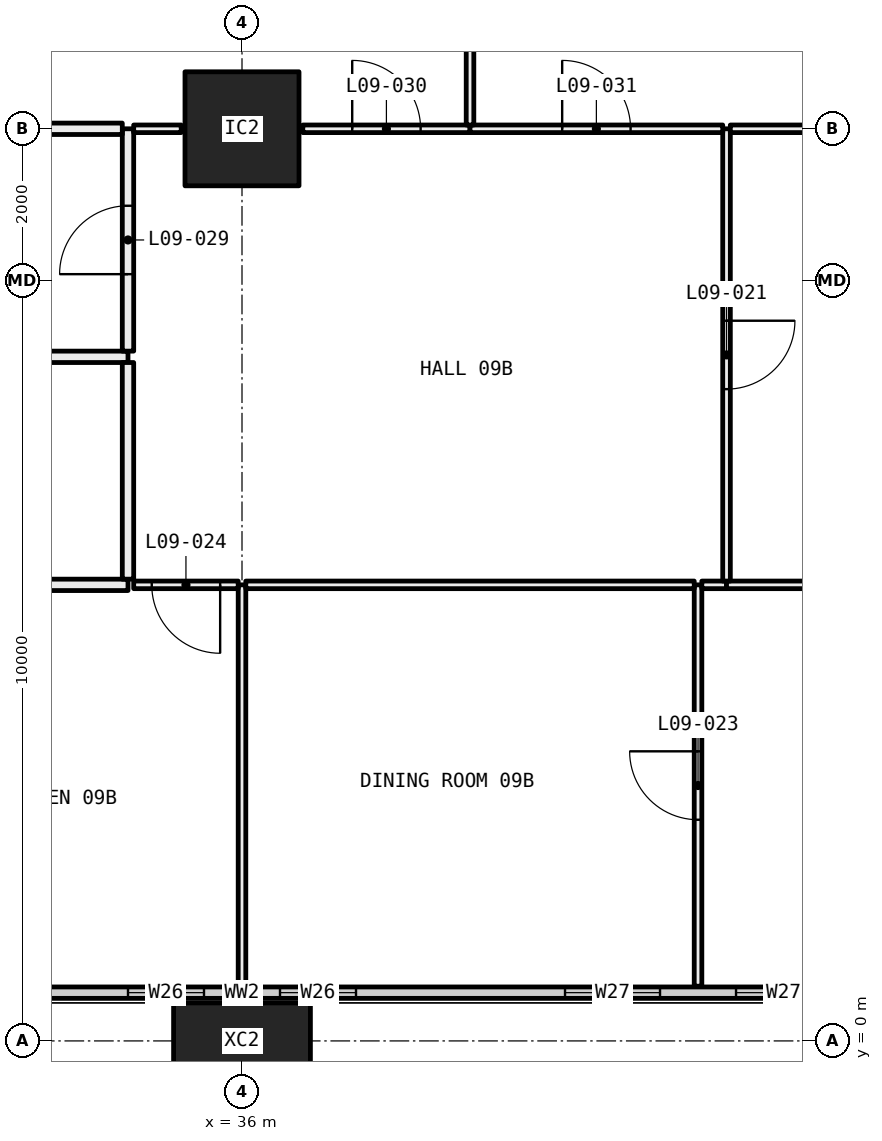
"""IFC4 building model, lengths in metres.
Left out: names, types, materials, properties, quantities, classifications, styles, units other than length and angle.
Written with IfcOpenShell. Run it as: python <this file> out.ifc"""

import sys

from ifc_helpers import new_model, si_unit, direction, frame, frame_2d, origin, origin_2d, place, context, subcontext, project, spatial, rectangle, hollow_rectangle, extrude, element, fill, save


model = new_model("IFC4")
c1 = context("Model", 3, precision=1e-05, world=origin(), true_north=direction((0.0, 1.0)))
c2 = subcontext(c1, "Body", "Model", "MODEL_VIEW")
j1 = project(units=[si_unit("LENGTHUNIT", "METRE"), si_unit("PLANEANGLEUNIT", "RADIAN")], contexts=[c1])
p1 = place(None, origin())
s1 = spatial("IfcSite", under=j1, at=p1, CompositionType="ELEMENT")
p2 = place(p1, origin())
s2 = spatial("IfcBuilding", under=s1, at=p2, CompositionType="ELEMENT")
p3 = place(p2, frame((0.0, 0.0, 43.8)))
s3 = spatial("IfcBuildingStorey", under=s2, at=p3, CompositionType="ELEMENT", Elevation=43.8)
p4 = place(p3, frame((36.0, 0.0, -0.4), z_axis=(0.0, 0.0, 1.0), x_axis=(1.0, 0.0, 0.0)))
e1 = element("IfcColumn", 1, at=p4, inside=s3, PredefinedType="COLUMN", context=c2, shape_type="SweptSolid", body=[
    extrude(hollow_rectangle(XDim=1.8, YDim=1.0, WallThickness=0.07, at=origin_2d()), origin(), (0.0, 0.0, 1.0), 3.45),
])
p5 = place(p3, frame((36.0, 12.0, 0.0), z_axis=(0.0, 0.0, 1.0), x_axis=(1.0, 0.0, 0.0)))
e2 = element("IfcColumn", 2, at=p5, inside=s3, PredefinedType="COLUMN", context=c2, shape_type="SweptSolid", body=[
    extrude(hollow_rectangle(XDim=1.5, YDim=1.5, WallThickness=0.065, at=origin_2d()), origin(), (0.0, 0.0, 1.0), 3.05),
])
p6 = place(p3, frame((6.56, 0.635, 0.0), z_axis=(0.0, 0.0, 1.0), x_axis=(1.0, 0.0, 0.0)))
e3 = element("IfcWall", 3, at=p6, inside=s3, PredefinedType="ELEMENTEDWALL", context=c2, shape_type="SweptSolid", body=[
    extrude(rectangle(XDim=58.88, YDim=0.15, at=frame_2d((29.44, 0.0))), origin(), (0.0, 0.0, 1.0), 3.05),
])
p7 = place(p6, frame((0.44, 0.0, 0.45)))
e4 = element("IfcOpeningElement", 4, at=p7, cuts=e3, PredefinedType="OPENING", context=c2, shape_type="SweptSolid", body=[
    extrude(rectangle(XDim=4.5, YDim=2.55, at=frame_2d((2.25, 1.275))), frame((0.0, 0.085, 0.0), z_axis=(0.0, -1.0, 0.0), x_axis=(1.0, 0.0, 0.0)), (0.0, 0.0, 1.0), 0.17),
])
p8 = place(p6, frame((5.94, 0.0, 0.45)))
e5 = element("IfcOpeningElement", 5, at=p8, cuts=e3, PredefinedType="OPENING", context=c2, shape_type="SweptSolid", body=[
    extrude(rectangle(XDim=1.0, YDim=2.55, at=frame_2d((0.5, 1.275))), frame((0.0, 0.085, 0.0), z_axis=(0.0, -1.0, 0.0), x_axis=(1.0, 0.0, 0.0)), (0.0, 0.0, 1.0), 0.17),
])
p9 = place(p6, frame((9.69, 0.0, 0.45)))
e6 = element("IfcOpeningElement", 6, at=p9, cuts=e3, PredefinedType="OPENING", context=c2, shape_type="SweptSolid", body=[
    extrude(rectangle(XDim=1.25, YDim=2.55, at=frame_2d((0.625, 1.275))), frame((0.0, 0.085, 0.0), z_axis=(0.0, -1.0, 0.0), x_axis=(1.0, 0.0, 0.0)), (0.0, 0.0, 1.0), 0.17),
])
p10 = place(p6, frame((11.94, 0.0, 0.45)))
e7 = element("IfcOpeningElement", 7, at=p10, cuts=e3, PredefinedType="OPENING", context=c2, shape_type="SweptSolid", body=[
    extrude(rectangle(XDim=1.25, YDim=2.55, at=frame_2d((0.625, 1.275))), frame((0.0, 0.085, 0.0), z_axis=(0.0, -1.0, 0.0), x_axis=(1.0, 0.0, 0.0)), (0.0, 0.0, 1.0), 0.17),
])
p11 = place(p6, frame((15.94, 0.0, 0.45)))
e8 = element("IfcOpeningElement", 8, at=p11, cuts=e3, PredefinedType="OPENING", context=c2, shape_type="SweptSolid", body=[
    extrude(rectangle(XDim=1.0, YDim=2.55, at=frame_2d((0.5, 1.275))), frame((0.0, 0.085, 0.0), z_axis=(0.0, -1.0, 0.0), x_axis=(1.0, 0.0, 0.0)), (0.0, 0.0, 1.0), 0.17),
])
p12 = place(p6, frame((17.94, 0.0, 0.45)))
e9 = element("IfcOpeningElement", 9, at=p12, cuts=e3, PredefinedType="OPENING", context=c2, shape_type="SweptSolid", body=[
    extrude(rectangle(XDim=1.0, YDim=2.55, at=frame_2d((0.5, 1.275))), frame((0.0, 0.085, 0.0), z_axis=(0.0, -1.0, 0.0), x_axis=(1.0, 0.0, 0.0)), (0.0, 0.0, 1.0), 0.17),
])
p13 = place(p6, frame((21.69, 0.0, 0.45)))
e10 = element("IfcOpeningElement", 10, at=p13, cuts=e3, PredefinedType="OPENING", context=c2, shape_type="SweptSolid", body=[
    extrude(rectangle(XDim=1.25, YDim=2.55, at=frame_2d((0.625, 1.275))), frame((0.0, 0.085, 0.0), z_axis=(0.0, -1.0, 0.0), x_axis=(1.0, 0.0, 0.0)), (0.0, 0.0, 1.0), 0.17),
])
p14 = place(p6, frame((23.94, 0.0, 0.45)))
e11 = element("IfcOpeningElement", 11, at=p14, cuts=e3, PredefinedType="OPENING", context=c2, shape_type="SweptSolid", body=[
    extrude(rectangle(XDim=1.25, YDim=2.55, at=frame_2d((0.625, 1.275))), frame((0.0, 0.085, 0.0), z_axis=(0.0, -1.0, 0.0), x_axis=(1.0, 0.0, 0.0)), (0.0, 0.0, 1.0), 0.17),
])
p15 = place(p6, frame((27.94, 0.0, 0.45)))
e12 = element("IfcOpeningElement", 12, at=p15, cuts=e3, PredefinedType="OPENING", context=c2, shape_type="SweptSolid", body=[
    extrude(rectangle(XDim=1.0, YDim=2.55, at=frame_2d((0.5, 1.275))), frame((0.0, 0.085, 0.0), z_axis=(0.0, -1.0, 0.0), x_axis=(1.0, 0.0, 0.0)), (0.0, 0.0, 1.0), 0.17),
])
p16 = place(p6, frame((29.94, 0.0, 0.45)))
e13 = element("IfcOpeningElement", 13, at=p16, cuts=e3, PredefinedType="OPENING", context=c2, shape_type="SweptSolid", body=[
    extrude(rectangle(XDim=1.0, YDim=2.55, at=frame_2d((0.5, 1.275))), frame((0.0, 0.085, 0.0), z_axis=(0.0, -1.0, 0.0), x_axis=(1.0, 0.0, 0.0)), (0.0, 0.0, 1.0), 0.17),
])
p17 = place(p6, frame((33.69, 0.0, 0.45)))
e14 = element("IfcOpeningElement", 14, at=p17, cuts=e3, PredefinedType="OPENING", context=c2, shape_type="SweptSolid", body=[
    extrude(rectangle(XDim=1.25, YDim=2.55, at=frame_2d((0.625, 1.275))), frame((0.0, 0.085, 0.0), z_axis=(0.0, -1.0, 0.0), x_axis=(1.0, 0.0, 0.0)), (0.0, 0.0, 1.0), 0.17),
])
p18 = place(p6, frame((35.94, 0.0, 0.45)))
e15 = element("IfcOpeningElement", 15, at=p18, cuts=e3, PredefinedType="OPENING", context=c2, shape_type="SweptSolid", body=[
    extrude(rectangle(XDim=1.25, YDim=2.55, at=frame_2d((0.625, 1.275))), frame((0.0, 0.085, 0.0), z_axis=(0.0, -1.0, 0.0), x_axis=(1.0, 0.0, 0.0)), (0.0, 0.0, 1.0), 0.17),
])
p19 = place(p6, frame((39.94, 0.0, 0.45)))
e16 = element("IfcOpeningElement", 16, at=p19, cuts=e3, PredefinedType="OPENING", context=c2, shape_type="SweptSolid", body=[
    extrude(rectangle(XDim=1.0, YDim=2.55, at=frame_2d((0.5, 1.275))), frame((0.0, 0.085, 0.0), z_axis=(0.0, -1.0, 0.0), x_axis=(1.0, 0.0, 0.0)), (0.0, 0.0, 1.0), 0.17),
])
p20 = place(p6, frame((41.94, 0.0, 0.45)))
e17 = element("IfcOpeningElement", 17, at=p20, cuts=e3, PredefinedType="OPENING", context=c2, shape_type="SweptSolid", body=[
    extrude(rectangle(XDim=1.0, YDim=2.55, at=frame_2d((0.5, 1.275))), frame((0.0, 0.085, 0.0), z_axis=(0.0, -1.0, 0.0), x_axis=(1.0, 0.0, 0.0)), (0.0, 0.0, 1.0), 0.17),
])
p21 = place(p6, frame((45.69, 0.0, 0.45)))
e18 = element("IfcOpeningElement", 18, at=p21, cuts=e3, PredefinedType="OPENING", context=c2, shape_type="SweptSolid", body=[
    extrude(rectangle(XDim=1.25, YDim=2.55, at=frame_2d((0.625, 1.275))), frame((0.0, 0.085, 0.0), z_axis=(0.0, -1.0, 0.0), x_axis=(1.0, 0.0, 0.0)), (0.0, 0.0, 1.0), 0.17),
])
p22 = place(p6, frame((47.94, 0.0, 0.45)))
e19 = element("IfcOpeningElement", 19, at=p22, cuts=e3, PredefinedType="OPENING", context=c2, shape_type="SweptSolid", body=[
    extrude(rectangle(XDim=1.25, YDim=2.55, at=frame_2d((0.625, 1.275))), frame((0.0, 0.085, 0.0), z_axis=(0.0, -1.0, 0.0), x_axis=(1.0, 0.0, 0.0)), (0.0, 0.0, 1.0), 0.17),
])
p23 = place(p6, frame((51.94, 0.0, 0.45)))
e20 = element("IfcOpeningElement", 20, at=p23, cuts=e3, PredefinedType="OPENING", context=c2, shape_type="SweptSolid", body=[
    extrude(rectangle(XDim=1.0, YDim=2.55, at=frame_2d((0.5, 1.275))), frame((0.0, 0.085, 0.0), z_axis=(0.0, -1.0, 0.0), x_axis=(1.0, 0.0, 0.0)), (0.0, 0.0, 1.0), 0.17),
])
p24 = place(p6, frame((53.94, 0.0, 0.45)))
e21 = element("IfcOpeningElement", 21, at=p24, cuts=e3, PredefinedType="OPENING", context=c2, shape_type="SweptSolid", body=[
    extrude(rectangle(XDim=4.5, YDim=2.55, at=frame_2d((2.25, 1.275))), frame((0.0, 0.085, 0.0), z_axis=(0.0, -1.0, 0.0), x_axis=(1.0, 0.0, 0.0)), (0.0, 0.0, 1.0), 0.17),
])
p25 = place(p3, frame((36.0, 0.72, 0.0), z_axis=(0.0, 0.0, 1.0), x_axis=(0.0, 1.0, 0.0)))
e22 = element("IfcWall", 22, at=p25, inside=s3, PredefinedType="PARTITIONING", context=c2, shape_type="SweptSolid", body=[
    extrude(rectangle(XDim=5.28, YDim=0.1, at=frame_2d((2.64, 0.0))), origin(), (0.0, 0.0, 1.0), 2.45),
])
p26 = place(p3, frame((34.5, 6.0, 0.0), z_axis=(0.0, 0.0, 1.0), x_axis=(-1.0, 0.0, 0.0)))
e23 = element("IfcWall", 23, at=p26, inside=s3, PredefinedType="PARTITIONING", context=c2, shape_type="SweptSolid", body=[
    extrude(rectangle(XDim=4.4, YDim=0.15, at=frame_2d((2.2, 0.0))), origin(), (0.0, 0.0, 1.0), 3.05),
])
p27 = place(p26, frame((1.75, 0.0, 0.0)))
e24 = element("IfcOpeningElement", 24, at=p27, cuts=e23, PredefinedType="OPENING", context=c2, shape_type="SweptSolid", body=[
    extrude(rectangle(XDim=0.9, YDim=2.1, at=frame_2d((0.45, 1.05))), frame((0.0, 0.085, 0.0), z_axis=(0.0, -1.0, 0.0), x_axis=(1.0, 0.0, 0.0)), (0.0, 0.0, 1.0), 0.17),
])
p28 = place(p3, frame((35.95, 6.0, 0.0), z_axis=(0.0, 0.0, 1.0), x_axis=(-1.0, 0.0, 0.0)))
e25 = element("IfcWall", 25, at=p28, inside=s3, PredefinedType="PARTITIONING", context=c2, shape_type="SweptSolid", body=[
    extrude(rectangle(XDim=1.375, YDim=0.1, at=frame_2d((0.688, 0.0))), origin(), (0.0, 0.0, 1.0), 2.45),
])
p29 = place(p28, frame((0.238, 0.0, 0.0)))
e26 = element("IfcOpeningElement", 26, at=p29, cuts=e25, PredefinedType="OPENING", context=c2, shape_type="SweptSolid", body=[
    extrude(rectangle(XDim=0.9, YDim=2.1, at=frame_2d((0.45, 1.05))), frame((0.0, 0.06, 0.0), z_axis=(0.0, -1.0, 0.0), x_axis=(1.0, 0.0, 0.0)), (0.0, 0.0, 1.0), 0.12),
])
p30 = place(p3, frame((42.0, 0.72, 0.0), z_axis=(0.0, 0.0, 1.0), x_axis=(0.0, 1.0, 0.0)))
e27 = element("IfcWall", 27, at=p30, inside=s3, PredefinedType="PARTITIONING", context=c2, shape_type="SweptSolid", body=[
    extrude(rectangle(XDim=5.28, YDim=0.1, at=frame_2d((2.64, 0.0))), origin(), (0.0, 0.0, 1.0), 3.05),
])
p31 = place(p30, frame((2.19, 0.0, 0.0)))
e28 = element("IfcOpeningElement", 28, at=p31, cuts=e27, PredefinedType="OPENING", context=c2, shape_type="SweptSolid", body=[
    extrude(rectangle(XDim=0.9, YDim=2.1, at=frame_2d((0.45, 1.05))), frame((0.0, 0.06, 0.0), z_axis=(0.0, -1.0, 0.0), x_axis=(1.0, 0.0, 0.0)), (0.0, 0.0, 1.0), 0.12),
])
p32 = place(p3, frame((41.95, 6.0, 0.0), z_axis=(0.0, 0.0, 1.0), x_axis=(-1.0, 0.0, 0.0)))
e29 = element("IfcWall", 29, at=p32, inside=s3, PredefinedType="PARTITIONING", context=c2, shape_type="SweptSolid", body=[
    extrude(rectangle(XDim=5.9, YDim=0.1, at=frame_2d((2.95, 0.0))), origin(), (0.0, 0.0, 1.0), 2.45),
])
p33 = place(p3, frame((42.375, 6.0, 0.0), z_axis=(0.0, 0.0, 1.0), x_axis=(-1.0, 0.0, 0.0)))
e30 = element("IfcWall", 30, at=p33, inside=s3, PredefinedType="PARTITIONING", context=c2, shape_type="SweptSolid", body=[
    extrude(rectangle(XDim=0.325, YDim=0.1, at=frame_2d((0.163, 0.0))), origin(), (0.0, 0.0, 1.0), 3.05),
])
p34 = place(p3, frame((47.9, 6.0, 0.0), z_axis=(0.0, 0.0, 1.0), x_axis=(-1.0, 0.0, 0.0)))
e31 = element("IfcWall", 31, at=p34, inside=s3, PredefinedType="PARTITIONING", context=c2, shape_type="SweptSolid", body=[
    extrude(rectangle(XDim=5.525, YDim=0.1, at=frame_2d((2.762, 0.0))), origin(), (0.0, 0.0, 1.0), 3.05),
])
p35 = place(p34, frame((2.312, 0.0, 0.0)))
e32 = element("IfcOpeningElement", 32, at=p35, cuts=e31, PredefinedType="OPENING", context=c2, shape_type="SweptSolid", body=[
    extrude(rectangle(XDim=0.9, YDim=2.1, at=frame_2d((0.45, 1.05))), frame((0.0, 0.06, 0.0), z_axis=(0.0, -1.0, 0.0), x_axis=(1.0, 0.0, 0.0)), (0.0, 0.0, 1.0), 0.12),
])
p36 = place(p3, frame((34.5, 9.0, 0.0), z_axis=(0.0, 0.0, 1.0), x_axis=(-1.0, 0.0, 0.0)))
e33 = element("IfcWall", 33, at=p36, inside=s3, PredefinedType="PARTITIONING", context=c2, shape_type="SweptSolid", body=[
    extrude(rectangle(XDim=4.4, YDim=0.15, at=frame_2d((2.2, 0.0))), origin(), (0.0, 0.0, 1.0), 3.05),
])
p37 = place(p3, frame((34.5, 6.075, 0.0), z_axis=(0.0, 0.0, 1.0), x_axis=(0.0, 1.0, 0.0)))
e34 = element("IfcWall", 34, at=p37, inside=s3, PredefinedType="PARTITIONING", context=c2, shape_type="SweptSolid", body=[
    extrude(rectangle(XDim=2.85, YDim=0.15, at=frame_2d((1.425, 0.0))), origin(), (0.0, 0.0, 1.0), 3.05),
])
p38 = place(p3, frame((34.5, 9.075, 0.0), z_axis=(0.0, 0.0, 1.0), x_axis=(0.0, 1.0, 0.0)))
e35 = element("IfcWall", 35, at=p38, inside=s3, PredefinedType="PARTITIONING", context=c2, shape_type="SweptSolid", body=[
    extrude(rectangle(XDim=2.925, YDim=0.15, at=frame_2d((1.462, 0.0))), origin(), (0.0, 0.0, 1.0), 2.45),
])
p39 = place(p38, frame((1.012, 0.0, 0.0)))
e36 = element("IfcOpeningElement", 36, at=p39, cuts=e35, PredefinedType="OPENING", context=c2, shape_type="SweptSolid", body=[
    extrude(rectangle(XDim=0.9, YDim=2.1, at=frame_2d((0.45, 1.05))), frame((0.0, 0.085, 0.0), z_axis=(0.0, -1.0, 0.0), x_axis=(1.0, 0.0, 0.0)), (0.0, 0.0, 1.0), 0.17),
])
p40 = place(p3, frame((34.425, 12.0, 0.0), z_axis=(0.0, 0.0, 1.0), x_axis=(-1.0, 0.0, 0.0)))
e37 = element("IfcWall", 37, at=p40, inside=s3, PredefinedType="PARTITIONING", context=c2, shape_type="SweptSolid", body=[
    extrude(rectangle(XDim=4.325, YDim=0.15, at=frame_2d((2.163, 0.0))), origin(), (0.0, 0.0, 1.0), 2.45),
])
p41 = place(p3, frame((42.375, 6.05, 0.0), z_axis=(0.0, 0.0, 1.0), x_axis=(0.0, 1.0, 0.0)))
e38 = element("IfcWall", 38, at=p41, inside=s3, PredefinedType="PARTITIONING", context=c2, shape_type="SweptSolid", body=[
    extrude(rectangle(XDim=5.95, YDim=0.1, at=frame_2d((2.975, 0.0))), origin(), (0.0, 0.0, 1.0), 2.45),
])
p42 = place(p41, frame((2.525, 0.0, 0.0)))
e39 = element("IfcOpeningElement", 39, at=p42, cuts=e38, PredefinedType="OPENING", context=c2, shape_type="SweptSolid", body=[
    extrude(rectangle(XDim=0.9, YDim=2.1, at=frame_2d((0.45, 1.05))), frame((0.0, 0.06, 0.0), z_axis=(0.0, -1.0, 0.0), x_axis=(1.0, 0.0, 0.0)), (0.0, 0.0, 1.0), 0.12),
])
p43 = place(p3, frame((35.2, 12.0, 0.0), z_axis=(0.0, 0.0, 1.0), x_axis=(-1.0, 0.0, 0.0)))
e40 = element("IfcWall", 40, at=p43, inside=s3, PredefinedType="PARTITIONING", context=c2, shape_type="SweptSolid", body=[
    extrude(rectangle(XDim=0.625, YDim=0.1, at=frame_2d((0.312, 0.0))), origin(), (0.0, 0.0, 1.0), 2.45),
])
p44 = place(p3, frame((39.0, 12.0, 0.0), z_axis=(0.0, 0.0, 1.0), x_axis=(-1.0, 0.0, 0.0)))
e41 = element("IfcWall", 41, at=p44, inside=s3, PredefinedType="PARTITIONING", context=c2, shape_type="SweptSolid", body=[
    extrude(rectangle(XDim=2.2, YDim=0.1, at=frame_2d((1.1, 0.0))), origin(), (0.0, 0.0, 1.0), 2.45),
])
p45 = place(p44, frame((0.65, 0.0, 0.0)))
e42 = element("IfcOpeningElement", 42, at=p45, cuts=e41, PredefinedType="OPENING", context=c2, shape_type="SweptSolid", body=[
    extrude(rectangle(XDim=0.9, YDim=2.1, at=frame_2d((0.45, 1.05))), frame((0.0, 0.06, 0.0), z_axis=(0.0, -1.0, 0.0), x_axis=(1.0, 0.0, 0.0)), (0.0, 0.0, 1.0), 0.12),
])
p46 = place(p3, frame((42.325, 12.0, 0.0), z_axis=(0.0, 0.0, 1.0), x_axis=(-1.0, 0.0, 0.0)))
e43 = element("IfcWall", 43, at=p46, inside=s3, PredefinedType="PARTITIONING", context=c2, shape_type="SweptSolid", body=[
    extrude(rectangle(XDim=3.325, YDim=0.1, at=frame_2d((1.663, 0.0))), origin(), (0.0, 0.0, 1.0), 2.45),
])
p47 = place(p46, frame((1.212, 0.0, 0.0)))
e44 = element("IfcOpeningElement", 44, at=p47, cuts=e43, PredefinedType="OPENING", context=c2, shape_type="SweptSolid", body=[
    extrude(rectangle(XDim=0.9, YDim=2.1, at=frame_2d((0.45, 1.05))), frame((0.0, 0.06, 0.0), z_axis=(0.0, -1.0, 0.0), x_axis=(1.0, 0.0, 0.0)), (0.0, 0.0, 1.0), 0.12),
])
p48 = place(p3, frame((43.5, 12.0, 0.0), z_axis=(0.0, 0.0, 1.0), x_axis=(-1.0, 0.0, 0.0)))
e45 = element("IfcWall", 45, at=p48, inside=s3, PredefinedType="PARTITIONING", context=c2, shape_type="SweptSolid", body=[
    extrude(rectangle(XDim=1.075, YDim=0.1, at=frame_2d((0.538, 0.0))), origin(), (0.0, 0.0, 1.0), 2.45),
])
p49 = place(p3, frame((39.0, 12.05, 0.0), z_axis=(0.0, 0.0, 1.0), x_axis=(0.0, 1.0, 0.0)))
e46 = element("IfcWall", 46, at=p49, inside=s3, PredefinedType="PARTITIONING", context=c2, shape_type="SweptSolid", body=[
    extrude(rectangle(XDim=5.85, YDim=0.1, at=frame_2d((2.925, 0.0))), origin(), (0.0, 0.0, 1.0), 2.45),
])
p50 = place(p15, origin())
e47 = element("IfcWindow", 47, at=p50, inside=s3, PartitioningType="SINGLE_PANEL", PredefinedType="WINDOW", context=c2, shape_type="SweptSolid", body=[
    extrude(rectangle(XDim=1.0, YDim=2.55, at=frame_2d((0.5, 1.275))), frame((0.0, 0.03, 0.0), z_axis=(0.0, -1.0, 0.0), x_axis=(1.0, 0.0, 0.0)), (0.0, 0.0, 1.0), 0.06),
])
fill(e12, e47)
p51 = place(p16, origin())
e48 = element("IfcWindow", 48, at=p51, inside=s3, PartitioningType="SINGLE_PANEL", PredefinedType="WINDOW", context=c2, shape_type="SweptSolid", body=[
    extrude(rectangle(XDim=1.0, YDim=2.55, at=frame_2d((0.5, 1.275))), frame((0.0, 0.03, 0.0), z_axis=(0.0, -1.0, 0.0), x_axis=(1.0, 0.0, 0.0)), (0.0, 0.0, 1.0), 0.06),
])
fill(e13, e48)
p52 = place(p17, origin())
e49 = element("IfcWindow", 49, at=p52, inside=s3, PartitioningType="SINGLE_PANEL", PredefinedType="WINDOW", context=c2, shape_type="SweptSolid", body=[
    extrude(rectangle(XDim=1.25, YDim=2.55, at=frame_2d((0.625, 1.275))), frame((0.0, 0.03, 0.0), z_axis=(0.0, -1.0, 0.0), x_axis=(1.0, 0.0, 0.0)), (0.0, 0.0, 1.0), 0.06),
])
fill(e14, e49)
p53 = place(p18, origin())
e50 = element("IfcWindow", 50, at=p53, inside=s3, PartitioningType="SINGLE_PANEL", PredefinedType="WINDOW", context=c2, shape_type="SweptSolid", body=[
    extrude(rectangle(XDim=1.25, YDim=2.55, at=frame_2d((0.625, 1.275))), frame((0.0, 0.03, 0.0), z_axis=(0.0, -1.0, 0.0), x_axis=(1.0, 0.0, 0.0)), (0.0, 0.0, 1.0), 0.06),
])
fill(e15, e50)
p54 = place(p42, frame((0.9, 0.0, 0.0), x_axis=(-1.0, 0.0, 0.0)))
e51 = element("IfcDoor", 51, at=p54, inside=s3, OperationType="SINGLE_SWING_RIGHT", PredefinedType="DOOR", context=c2, shape_type="SweptSolid", body=[
    extrude(rectangle(XDim=0.9, YDim=2.1, at=frame_2d((0.45, 1.05))), frame((0.0, 0.025, 0.0), z_axis=(0.0, -1.0, 0.0), x_axis=(1.0, 0.0, 0.0)), (0.0, 0.0, 1.0), 0.05),
])
fill(e39, e51)
p55 = place(p31, origin())
e52 = element("IfcDoor", 52, at=p55, inside=s3, OperationType="SINGLE_SWING_LEFT", PredefinedType="DOOR", context=c2, shape_type="SweptSolid", body=[
    extrude(rectangle(XDim=0.9, YDim=2.1, at=frame_2d((0.45, 1.05))), frame((0.0, 0.025, 0.0), z_axis=(0.0, -1.0, 0.0), x_axis=(1.0, 0.0, 0.0)), (0.0, 0.0, 1.0), 0.05),
])
fill(e28, e52)
p56 = place(p29, origin())
e53 = element("IfcDoor", 53, at=p56, inside=s3, OperationType="SINGLE_SWING_RIGHT", PredefinedType="DOOR", context=c2, shape_type="SweptSolid", body=[
    extrude(rectangle(XDim=0.9, YDim=2.1, at=frame_2d((0.45, 1.05))), frame((0.0, 0.025, 0.0), z_axis=(0.0, -1.0, 0.0), x_axis=(1.0, 0.0, 0.0)), (0.0, 0.0, 1.0), 0.05),
])
fill(e26, e53)
p57 = place(p39, origin())
e54 = element("IfcDoor", 54, at=p57, inside=s3, OperationType="SINGLE_SWING_RIGHT", PredefinedType="DOOR", context=c2, shape_type="SweptSolid", body=[
    extrude(rectangle(XDim=0.9, YDim=2.1, at=frame_2d((0.45, 1.05))), frame((0.0, 0.025, 0.0), z_axis=(0.0, -1.0, 0.0), x_axis=(1.0, 0.0, 0.0)), (0.0, 0.0, 1.0), 0.05),
])
fill(e36, e54)
p58 = place(p45, frame((0.9, 0.0, 0.0), x_axis=(-1.0, 0.0, 0.0)))
e55 = element("IfcDoor", 55, at=p58, inside=s3, OperationType="SINGLE_SWING_RIGHT", PredefinedType="DOOR", context=c2, shape_type="SweptSolid", body=[
    extrude(rectangle(XDim=0.9, YDim=2.1, at=frame_2d((0.45, 1.05))), frame((0.0, 0.025, 0.0), z_axis=(0.0, -1.0, 0.0), x_axis=(1.0, 0.0, 0.0)), (0.0, 0.0, 1.0), 0.05),
])
fill(e42, e55)
p59 = place(p47, frame((0.9, 0.0, 0.0), x_axis=(-1.0, 0.0, 0.0)))
e56 = element("IfcDoor", 56, at=p59, inside=s3, OperationType="SINGLE_SWING_RIGHT", PredefinedType="DOOR", context=c2, shape_type="SweptSolid", body=[
    extrude(rectangle(XDim=0.9, YDim=2.1, at=frame_2d((0.45, 1.05))), frame((0.0, 0.025, 0.0), z_axis=(0.0, -1.0, 0.0), x_axis=(1.0, 0.0, 0.0)), (0.0, 0.0, 1.0), 0.05),
])
fill(e44, e56)
save(model, sys.argv[1])
